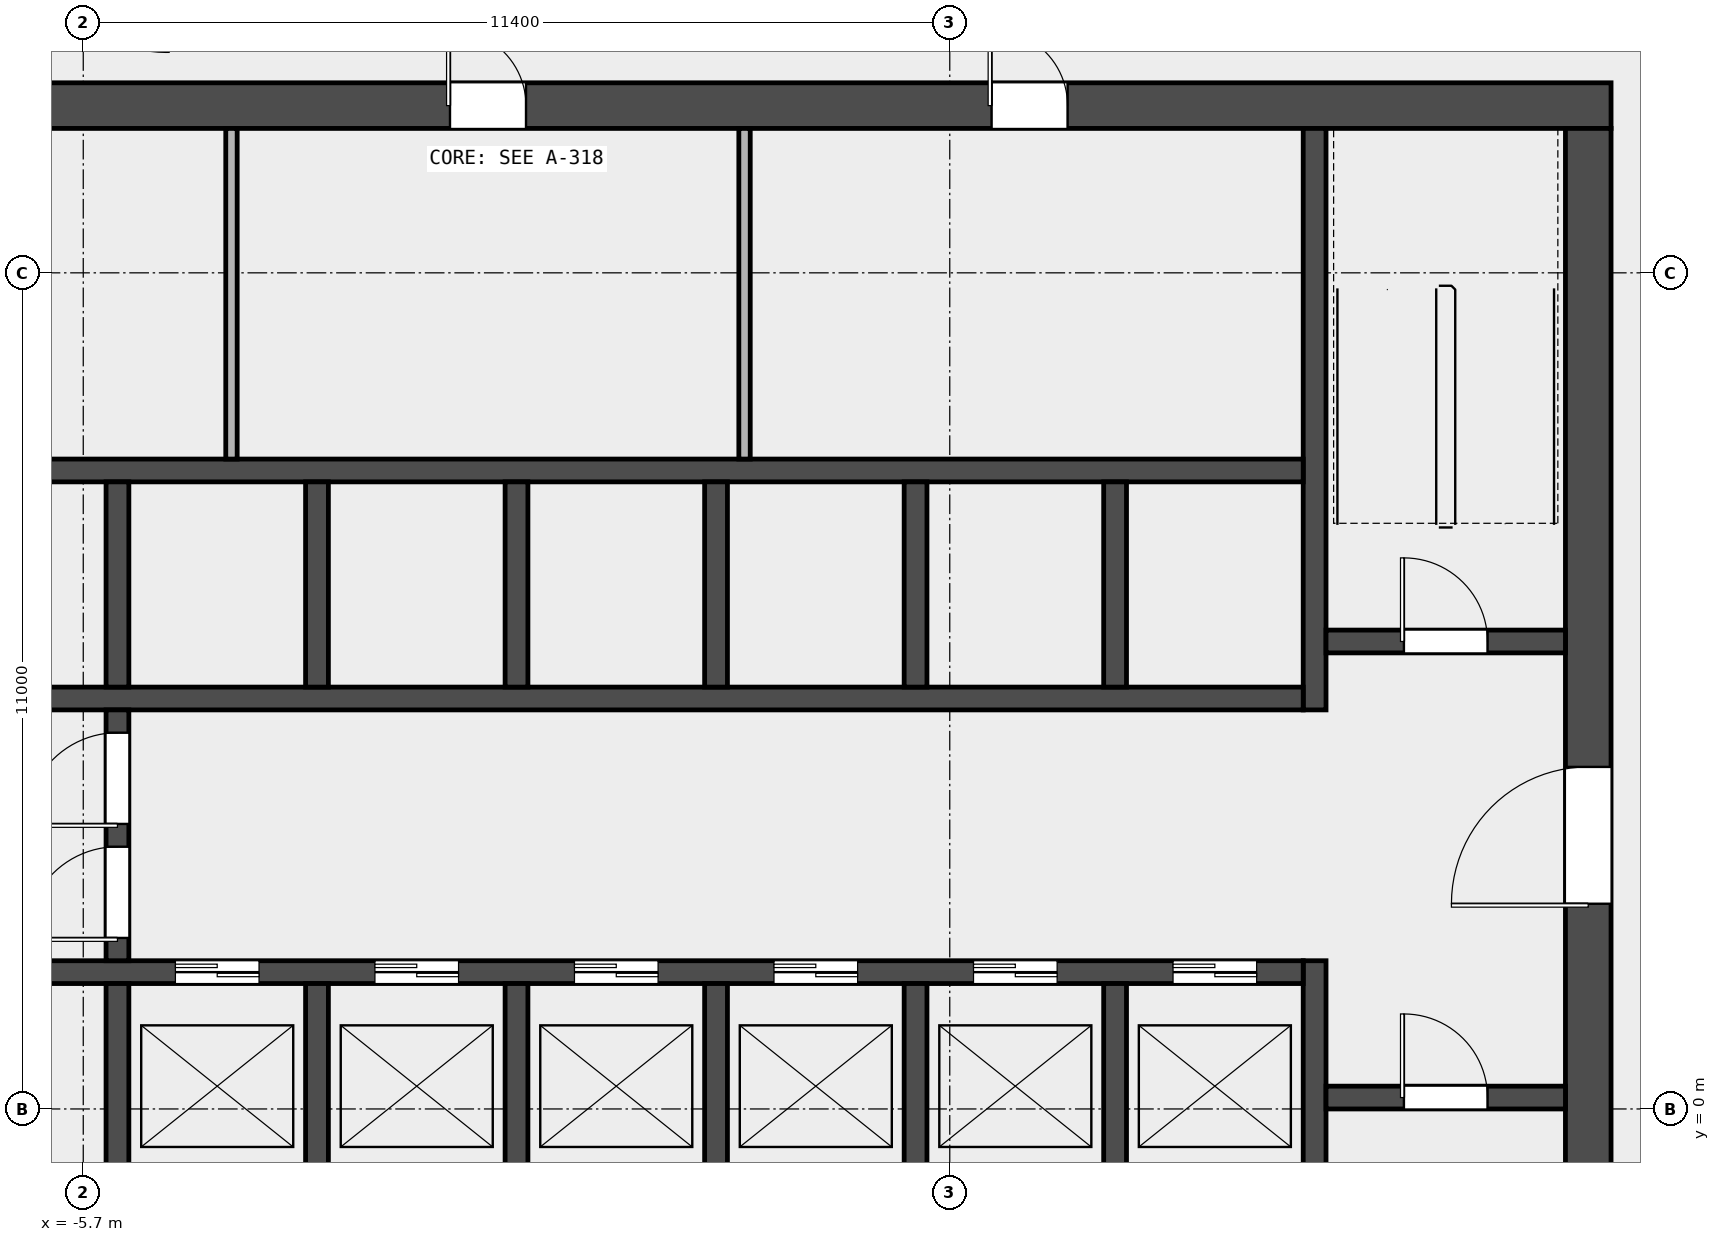
"""IFC4 building model, lengths in metres.
Left out: names, types, materials, properties, quantities, classifications, styles, units other than length and angle.
Written with IfcOpenShell. Run it as: python <this file> out.ifc"""

import sys

from ifc_helpers import new_model, si_unit, direction, frame, frame_2d, origin, place, context, subcontext, project, spatial, rectangle, extrude, element, fill, save


model = new_model("IFC4")
c1 = context("Model", 3, precision=1e-05, world=origin(), true_north=direction((0.0, 1.0)))
c2 = subcontext(c1, "Body", "Model", "MODEL_VIEW")
j1 = project(units=[si_unit("LENGTHUNIT", "METRE"), si_unit("PLANEANGLEUNIT", "RADIAN")], contexts=[c1])
p1 = place(None, origin())
s1 = spatial("IfcSite", under=j1, at=p1, CompositionType="ELEMENT")
p2 = place(p1, origin())
s2 = spatial("IfcBuilding", under=s1, at=p2, CompositionType="ELEMENT")
p3 = place(p2, frame((0.0, 0.0, 201.0)))
s3 = spatial("IfcBuildingStorey", under=s2, at=p3, CompositionType="ELEMENT", Elevation=201.0)
p4 = place(p3, frame((-14.4, 13.2, 0.0), z_axis=(0.0, 0.0, 1.0), x_axis=(1.0, 0.0, 0.0)))
e1 = element("IfcWall", 1, at=p4, inside=s3, PredefinedType="SHEAR", context=c2, shape_type="SweptSolid", body=[
    extrude(rectangle(XDim=28.8, YDim=0.6, at=frame_2d((14.4, 0.0))), origin(), (0.0, 0.0, 1.0), 3.7),
])
p5 = place(p4, frame((6.775, 0.0, 0.0)))
e2 = element("IfcOpeningElement", 2, at=p5, cuts=e1, PredefinedType="OPENING", context=c2, shape_type="SweptSolid", body=[
    extrude(rectangle(XDim=1.0, YDim=2.1, at=frame_2d((0.5, 1.05))), frame((0.0, 0.312, 0.0), z_axis=(0.0, -1.0, 0.0), x_axis=(1.0, 0.0, 0.0)), (0.0, 0.0, 1.0), 0.624),
])
p6 = place(p4, frame((13.525, 0.0, 0.0)))
e3 = element("IfcOpeningElement", 3, at=p6, cuts=e1, PredefinedType="OPENING", context=c2, shape_type="SweptSolid", body=[
    extrude(rectangle(XDim=1.0, YDim=2.1, at=frame_2d((0.5, 1.05))), frame((0.0, 0.312, 0.0), z_axis=(0.0, -1.0, 0.0), x_axis=(1.0, 0.0, 0.0)), (0.0, 0.0, 1.0), 0.624),
])
p7 = place(p4, frame((20.65, 0.0, 0.0)))
e4 = element("IfcOpeningElement", 4, at=p7, cuts=e1, PredefinedType="OPENING", context=c2, shape_type="SweptSolid", body=[
    extrude(rectangle(XDim=1.0, YDim=2.1, at=frame_2d((0.5, 1.05))), frame((0.0, 0.312, 0.0), z_axis=(0.0, -1.0, 0.0), x_axis=(1.0, 0.0, 0.0)), (0.0, 0.0, 1.0), 0.624),
])
p8 = place(p3, frame((14.1, -6.6, 0.0), z_axis=(0.0, 0.0, 1.0), x_axis=(0.0, 1.0, 0.0)))
e5 = element("IfcWall", 5, at=p8, inside=s3, PredefinedType="SHEAR", context=c2, shape_type="SweptSolid", body=[
    extrude(rectangle(XDim=19.5, YDim=0.6, at=frame_2d((9.75, 0.0))), origin(), (0.0, 0.0, 1.0), 3.7),
])
p9 = place(p8, frame((9.3, 0.0, 0.0)))
e6 = element("IfcOpeningElement", 6, at=p9, cuts=e5, PredefinedType="OPENING", context=c2, shape_type="SweptSolid", body=[
    extrude(rectangle(XDim=1.8, YDim=2.1, at=frame_2d((0.9, 1.05))), frame((0.0, 0.312, 0.0), z_axis=(0.0, -1.0, 0.0), x_axis=(1.0, 0.0, 0.0)), (0.0, 0.0, 1.0), 0.624),
])
p10 = place(p3, frame((10.5, -6.6, 0.0), z_axis=(0.0, 0.0, 1.0), x_axis=(0.0, 1.0, 0.0)))
e7 = element("IfcWall", 7, at=p10, inside=s3, PredefinedType="SHEAR", context=c2, shape_type="SweptSolid", body=[
    extrude(rectangle(XDim=8.55, YDim=0.3, at=frame_2d((4.275, 0.0))), origin(), (0.0, 0.0, 1.0), 3.7),
])
p11 = place(p3, frame((10.5, 5.25, 0.0), z_axis=(0.0, 0.0, 1.0), x_axis=(0.0, 1.0, 0.0)))
e8 = element("IfcWall", 8, at=p11, inside=s3, PredefinedType="SHEAR", context=c2, shape_type="SweptSolid", body=[
    extrude(rectangle(XDim=7.65, YDim=0.3, at=frame_2d((3.825, 0.0))), origin(), (0.0, 0.0, 1.0), 3.7),
])
p12 = place(p3, frame((10.65, 0.15, 0.0), z_axis=(0.0, 0.0, 1.0), x_axis=(1.0, 0.0, 0.0)))
e9 = element("IfcWall", 9, at=p12, inside=s3, PredefinedType="SOLIDWALL", context=c2, shape_type="SweptSolid", body=[
    extrude(rectangle(XDim=3.15, YDim=0.3, at=frame_2d((1.575, 0.0))), origin(), (0.0, 0.0, 1.0), 3.7),
])
p13 = place(p12, frame((1.025, 0.0, 0.0)))
e10 = element("IfcOpeningElement", 10, at=p13, cuts=e9, PredefinedType="OPENING", context=c2, shape_type="SweptSolid", body=[
    extrude(rectangle(XDim=1.1, YDim=2.1, at=frame_2d((0.55, 1.05))), frame((0.0, 0.162, 0.0), z_axis=(0.0, -1.0, 0.0), x_axis=(1.0, 0.0, 0.0)), (0.0, 0.0, 1.0), 0.324),
])
p14 = place(p3, frame((10.65, 6.15, 0.0), z_axis=(0.0, 0.0, 1.0), x_axis=(1.0, 0.0, 0.0)))
e11 = element("IfcWall", 11, at=p14, inside=s3, PredefinedType="SOLIDWALL", context=c2, shape_type="SweptSolid", body=[
    extrude(rectangle(XDim=3.15, YDim=0.3, at=frame_2d((1.575, 0.0))), origin(), (0.0, 0.0, 1.0), 3.7),
])
p15 = place(p14, frame((1.025, 0.0, 0.0)))
e12 = element("IfcOpeningElement", 12, at=p15, cuts=e11, PredefinedType="OPENING", context=c2, shape_type="SweptSolid", body=[
    extrude(rectangle(XDim=1.1, YDim=2.1, at=frame_2d((0.55, 1.05))), frame((0.0, 0.162, 0.0), z_axis=(0.0, -1.0, 0.0), x_axis=(1.0, 0.0, 0.0)), (0.0, 0.0, 1.0), 0.324),
])
p16 = place(p3, frame((-10.35, 1.8, 0.0), z_axis=(0.0, 0.0, 1.0), x_axis=(1.0, 0.0, 0.0)))
e13 = element("IfcWall", 13, at=p16, inside=s3, PredefinedType="SOLIDWALL", context=c2, shape_type="SweptSolid", body=[
    extrude(rectangle(XDim=20.7, YDim=0.3, at=frame_2d((10.35, 0.0))), origin(), (0.0, 0.0, 1.0), 3.7),
])
p17 = place(p16, frame((0.512, 0.0, 0.0)))
e14 = element("IfcOpeningElement", 14, at=p17, cuts=e13, PredefinedType="OPENING", context=c2, shape_type="SweptSolid", body=[
    extrude(rectangle(XDim=1.3, YDim=2.1, at=frame_2d((0.65, 1.05))), frame((0.0, 0.162, 0.0), z_axis=(0.0, -1.0, 0.0), x_axis=(1.0, 0.0, 0.0)), (0.0, 0.0, 1.0), 0.324),
])
p18 = place(p16, frame((5.863, 0.0, 0.0)))
e15 = element("IfcOpeningElement", 15, at=p18, cuts=e13, PredefinedType="OPENING", context=c2, shape_type="SweptSolid", body=[
    extrude(rectangle(XDim=1.1, YDim=2.1, at=frame_2d((0.55, 1.05))), frame((0.0, 0.162, 0.0), z_axis=(0.0, -1.0, 0.0), x_axis=(1.0, 0.0, 0.0)), (0.0, 0.0, 1.0), 0.324),
])
p19 = place(p16, frame((8.488, 0.0, 0.0)))
e16 = element("IfcOpeningElement", 16, at=p19, cuts=e13, PredefinedType="OPENING", context=c2, shape_type="SweptSolid", body=[
    extrude(rectangle(XDim=1.1, YDim=2.1, at=frame_2d((0.55, 1.05))), frame((0.0, 0.162, 0.0), z_axis=(0.0, -1.0, 0.0), x_axis=(1.0, 0.0, 0.0)), (0.0, 0.0, 1.0), 0.324),
])
p20 = place(p16, frame((11.113, 0.0, 0.0)))
e17 = element("IfcOpeningElement", 17, at=p20, cuts=e13, PredefinedType="OPENING", context=c2, shape_type="SweptSolid", body=[
    extrude(rectangle(XDim=1.1, YDim=2.1, at=frame_2d((0.55, 1.05))), frame((0.0, 0.162, 0.0), z_axis=(0.0, -1.0, 0.0), x_axis=(1.0, 0.0, 0.0)), (0.0, 0.0, 1.0), 0.324),
])
p21 = place(p16, frame((13.738, 0.0, 0.0)))
e18 = element("IfcOpeningElement", 18, at=p21, cuts=e13, PredefinedType="OPENING", context=c2, shape_type="SweptSolid", body=[
    extrude(rectangle(XDim=1.1, YDim=2.1, at=frame_2d((0.55, 1.05))), frame((0.0, 0.162, 0.0), z_axis=(0.0, -1.0, 0.0), x_axis=(1.0, 0.0, 0.0)), (0.0, 0.0, 1.0), 0.324),
])
p22 = place(p16, frame((16.363, 0.0, 0.0)))
e19 = element("IfcOpeningElement", 19, at=p22, cuts=e13, PredefinedType="OPENING", context=c2, shape_type="SweptSolid", body=[
    extrude(rectangle(XDim=1.1, YDim=2.1, at=frame_2d((0.55, 1.05))), frame((0.0, 0.162, 0.0), z_axis=(0.0, -1.0, 0.0), x_axis=(1.0, 0.0, 0.0)), (0.0, 0.0, 1.0), 0.324),
])
p23 = place(p16, frame((18.988, 0.0, 0.0)))
e20 = element("IfcOpeningElement", 20, at=p23, cuts=e13, PredefinedType="OPENING", context=c2, shape_type="SweptSolid", body=[
    extrude(rectangle(XDim=1.1, YDim=2.1, at=frame_2d((0.55, 1.05))), frame((0.0, 0.162, 0.0), z_axis=(0.0, -1.0, 0.0), x_axis=(1.0, 0.0, 0.0)), (0.0, 0.0, 1.0), 0.324),
])
p24 = place(p3, frame((-10.35, 5.4, 0.0), z_axis=(0.0, 0.0, 1.0), x_axis=(1.0, 0.0, 0.0)))
e21 = element("IfcWall", 21, at=p24, inside=s3, PredefinedType="SOLIDWALL", context=c2, shape_type="SweptSolid", body=[
    extrude(rectangle(XDim=20.7, YDim=0.3, at=frame_2d((10.35, 0.0))), origin(), (0.0, 0.0, 1.0), 3.7),
])
p25 = place(p24, frame((0.512, 0.0, 0.0)))
e22 = element("IfcOpeningElement", 22, at=p25, cuts=e21, PredefinedType="OPENING", context=c2, shape_type="SweptSolid", body=[
    extrude(rectangle(XDim=1.3, YDim=2.1, at=frame_2d((0.65, 1.05))), frame((0.0, 0.162, 0.0), z_axis=(0.0, -1.0, 0.0), x_axis=(1.0, 0.0, 0.0)), (0.0, 0.0, 1.0), 0.324),
])
p26 = place(p3, frame((-10.35, 8.4, 0.0), z_axis=(0.0, 0.0, 1.0), x_axis=(1.0, 0.0, 0.0)))
e23 = element("IfcWall", 23, at=p26, inside=s3, PredefinedType="SOLIDWALL", context=c2, shape_type="SweptSolid", body=[
    extrude(rectangle(XDim=20.7, YDim=0.3, at=frame_2d((10.35, 0.0))), origin(), (0.0, 0.0, 1.0), 3.7),
])
for number, where, z_axis, x_axis in (
    (24, (-5.25, -1.05, 0.0), (0.0, 0.0, 1.0), (0.0, 1.0, 0.0)),
    (25, (-2.625, -1.05, 0.0), (0.0, 0.0, 1.0), (0.0, 1.0, 0.0)),
    (26, (0.0, -1.05, 0.0), (0.0, 0.0, 1.0), (0.0, 1.0, 0.0)),
    (27, (2.625, -1.05, 0.0), (0.0, 0.0, 1.0), (0.0, 1.0, 0.0)),
    (28, (5.25, -1.05, 0.0), (0.0, 0.0, 1.0), (0.0, 1.0, 0.0)),
    (29, (7.875, -1.05, 0.0), (0.0, 0.0, 1.0), (0.0, 1.0, 0.0)),
    (30, (-5.25, 5.55, 0.0), (0.0, 0.0, 1.0), (0.0, 1.0, 0.0)),
    (31, (-2.625, 5.55, 0.0), (0.0, 0.0, 1.0), (0.0, 1.0, 0.0)),
    (32, (0.0, 5.55, 0.0), (0.0, 0.0, 1.0), (0.0, 1.0, 0.0)),
    (33, (2.625, 5.55, 0.0), (0.0, 0.0, 1.0), (0.0, 1.0, 0.0)),
    (34, (5.25, 5.55, 0.0), (0.0, 0.0, 1.0), (0.0, 1.0, 0.0)),
    (35, (7.875, 5.55, 0.0), (0.0, 0.0, 1.0), (0.0, 1.0, 0.0)),
):
    element("IfcWall", number, at=place(p3, frame(where, z_axis=z_axis, x_axis=x_axis)), inside=s3, PredefinedType="SOLIDWALL", context=c2, shape_type="SweptSolid", body=[
        extrude(rectangle(XDim=2.7, YDim=0.3, at=frame_2d((1.35, 0.0))), origin(), (0.0, 0.0, 1.0), 3.7),
    ])
p27 = place(p3, frame((-5.25, 1.95, 0.0), z_axis=(0.0, 0.0, 1.0), x_axis=(0.0, 1.0, 0.0)))
e36 = element("IfcWall", 36, at=p27, inside=s3, PredefinedType="SOLIDWALL", context=c2, shape_type="SweptSolid", body=[
    extrude(rectangle(XDim=3.3, YDim=0.3, at=frame_2d((1.65, 0.0))), origin(), (0.0, 0.0, 1.0), 3.7),
])
p28 = place(p27, frame((0.3, 0.0, 0.0)))
e37 = element("IfcOpeningElement", 37, at=p28, cuts=e36, PredefinedType="OPENING", context=c2, shape_type="SweptSolid", body=[
    extrude(rectangle(XDim=1.2, YDim=2.1, at=frame_2d((0.6, 1.05))), frame((0.0, 0.162, 0.0), z_axis=(0.0, -1.0, 0.0), x_axis=(1.0, 0.0, 0.0)), (0.0, 0.0, 1.0), 0.324),
])
p29 = place(p27, frame((1.8, 0.0, 0.0)))
e38 = element("IfcOpeningElement", 38, at=p29, cuts=e36, PredefinedType="OPENING", context=c2, shape_type="SweptSolid", body=[
    extrude(rectangle(XDim=1.2, YDim=2.1, at=frame_2d((0.6, 1.05))), frame((0.0, 0.162, 0.0), z_axis=(0.0, -1.0, 0.0), x_axis=(1.0, 0.0, 0.0)), (0.0, 0.0, 1.0), 0.324),
])
for number, where, z_axis, x_axis in (
    (39, (-3.75, 8.55, 0.0), (0.0, 0.0, 1.0), (0.0, 1.0, 0.0)),
    (40, (3.0, 8.55, 0.0), (0.0, 0.0, 1.0), (0.0, 1.0, 0.0)),
):
    element("IfcWall", number, at=place(p3, frame(where, z_axis=z_axis, x_axis=x_axis)), inside=s3, PredefinedType="PARTITIONING", context=c2, shape_type="SweptSolid", body=[
        extrude(rectangle(XDim=4.35, YDim=0.15, at=frame_2d((2.175, 0.0))), origin(), (0.0, 0.0, 1.0), 3.7),
    ])
p30 = place(p13, origin())
e41 = element("IfcDoor", 41, at=p30, inside=s3, OperationType="SINGLE_SWING_RIGHT", PredefinedType="DOOR", context=c2, shape_type="SweptSolid", body=[
    extrude(rectangle(XDim=1.1, YDim=2.1, at=frame_2d((0.55, 1.05))), frame((0.0, 0.025, 0.0), z_axis=(0.0, -1.0, 0.0), x_axis=(1.0, 0.0, 0.0)), (0.0, 0.0, 1.0), 0.05),
])
fill(e10, e41)
p31 = place(p15, origin())
e42 = element("IfcDoor", 42, at=p31, inside=s3, OperationType="SINGLE_SWING_RIGHT", PredefinedType="DOOR", context=c2, shape_type="SweptSolid", body=[
    extrude(rectangle(XDim=1.1, YDim=2.1, at=frame_2d((0.55, 1.05))), frame((0.0, 0.025, 0.0), z_axis=(0.0, -1.0, 0.0), x_axis=(1.0, 0.0, 0.0)), (0.0, 0.0, 1.0), 0.05),
])
fill(e12, e42)
p32 = place(p9, origin())
e43 = element("IfcDoor", 43, at=p32, inside=s3, OperationType="DOUBLE_DOOR_SINGLE_SWING", PredefinedType="DOOR", context=c2, shape_type="SweptSolid", body=[
    extrude(rectangle(XDim=1.8, YDim=2.1, at=frame_2d((0.9, 1.05))), frame((0.0, 0.025, 0.0), z_axis=(0.0, -1.0, 0.0), x_axis=(1.0, 0.0, 0.0)), (0.0, 0.0, 1.0), 0.05),
])
fill(e6, e43)
p33 = place(p28, origin())
e44 = element("IfcDoor", 44, at=p33, inside=s3, OperationType="SINGLE_SWING_LEFT", PredefinedType="DOOR", context=c2, shape_type="SweptSolid", body=[
    extrude(rectangle(XDim=1.2, YDim=2.1, at=frame_2d((0.6, 1.05))), frame((0.0, 0.025, 0.0), z_axis=(0.0, -1.0, 0.0), x_axis=(1.0, 0.0, 0.0)), (0.0, 0.0, 1.0), 0.05),
])
fill(e37, e44)
p34 = place(p29, origin())
e45 = element("IfcDoor", 45, at=p34, inside=s3, OperationType="SINGLE_SWING_RIGHT", PredefinedType="DOOR", context=c2, shape_type="SweptSolid", body=[
    extrude(rectangle(XDim=1.2, YDim=2.1, at=frame_2d((0.6, 1.05))), frame((0.0, 0.025, 0.0), z_axis=(0.0, -1.0, 0.0), x_axis=(1.0, 0.0, 0.0)), (0.0, 0.0, 1.0), 0.05),
])
fill(e38, e45)
p35 = place(p18, origin())
e46 = element("IfcDoor", 46, at=p35, inside=s3, OperationType="DOUBLE_DOOR_SLIDING", PredefinedType="DOOR", context=c2, shape_type="SweptSolid", body=[
    extrude(rectangle(XDim=1.1, YDim=2.1, at=frame_2d((0.55, 1.05))), frame((0.0, 0.025, 0.0), z_axis=(0.0, -1.0, 0.0), x_axis=(1.0, 0.0, 0.0)), (0.0, 0.0, 1.0), 0.05),
])
fill(e15, e46)
p36 = place(p19, origin())
e47 = element("IfcDoor", 47, at=p36, inside=s3, OperationType="DOUBLE_DOOR_SLIDING", PredefinedType="DOOR", context=c2, shape_type="SweptSolid", body=[
    extrude(rectangle(XDim=1.1, YDim=2.1, at=frame_2d((0.55, 1.05))), frame((0.0, 0.025, 0.0), z_axis=(0.0, -1.0, 0.0), x_axis=(1.0, 0.0, 0.0)), (0.0, 0.0, 1.0), 0.05),
])
fill(e16, e47)
p37 = place(p20, origin())
e48 = element("IfcDoor", 48, at=p37, inside=s3, OperationType="DOUBLE_DOOR_SLIDING", PredefinedType="DOOR", context=c2, shape_type="SweptSolid", body=[
    extrude(rectangle(XDim=1.1, YDim=2.1, at=frame_2d((0.55, 1.05))), frame((0.0, 0.025, 0.0), z_axis=(0.0, -1.0, 0.0), x_axis=(1.0, 0.0, 0.0)), (0.0, 0.0, 1.0), 0.05),
])
fill(e17, e48)
p38 = place(p21, origin())
e49 = element("IfcDoor", 49, at=p38, inside=s3, OperationType="DOUBLE_DOOR_SLIDING", PredefinedType="DOOR", context=c2, shape_type="SweptSolid", body=[
    extrude(rectangle(XDim=1.1, YDim=2.1, at=frame_2d((0.55, 1.05))), frame((0.0, 0.025, 0.0), z_axis=(0.0, -1.0, 0.0), x_axis=(1.0, 0.0, 0.0)), (0.0, 0.0, 1.0), 0.05),
])
fill(e18, e49)
p39 = place(p22, origin())
e50 = element("IfcDoor", 50, at=p39, inside=s3, OperationType="DOUBLE_DOOR_SLIDING", PredefinedType="DOOR", context=c2, shape_type="SweptSolid", body=[
    extrude(rectangle(XDim=1.1, YDim=2.1, at=frame_2d((0.55, 1.05))), frame((0.0, 0.025, 0.0), z_axis=(0.0, -1.0, 0.0), x_axis=(1.0, 0.0, 0.0)), (0.0, 0.0, 1.0), 0.05),
])
fill(e19, e50)
p40 = place(p23, origin())
e51 = element("IfcDoor", 51, at=p40, inside=s3, OperationType="DOUBLE_DOOR_SLIDING", PredefinedType="DOOR", context=c2, shape_type="SweptSolid", body=[
    extrude(rectangle(XDim=1.1, YDim=2.1, at=frame_2d((0.55, 1.05))), frame((0.0, 0.025, 0.0), z_axis=(0.0, -1.0, 0.0), x_axis=(1.0, 0.0, 0.0)), (0.0, 0.0, 1.0), 0.05),
])
fill(e20, e51)
p41 = place(p6, origin())
e52 = element("IfcDoor", 52, at=p41, inside=s3, OperationType="SINGLE_SWING_LEFT", PredefinedType="DOOR", context=c2, shape_type="SweptSolid", body=[
    extrude(rectangle(XDim=1.0, YDim=2.1, at=frame_2d((0.5, 1.05))), frame((0.0, 0.025, 0.0), z_axis=(0.0, -1.0, 0.0), x_axis=(1.0, 0.0, 0.0)), (0.0, 0.0, 1.0), 0.05),
])
fill(e3, e52)
p42 = place(p7, origin())
e53 = element("IfcDoor", 53, at=p42, inside=s3, OperationType="SINGLE_SWING_LEFT", PredefinedType="DOOR", context=c2, shape_type="SweptSolid", body=[
    extrude(rectangle(XDim=1.0, YDim=2.1, at=frame_2d((0.5, 1.05))), frame((0.0, 0.025, 0.0), z_axis=(0.0, -1.0, 0.0), x_axis=(1.0, 0.0, 0.0)), (0.0, 0.0, 1.0), 0.05),
])
fill(e4, e53)
save(model, sys.argv[1])
